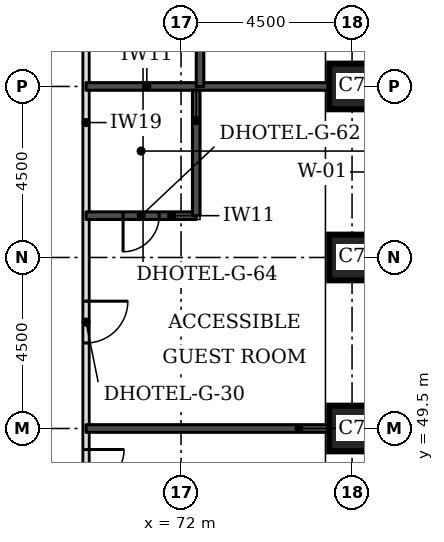
"""IFC4 building model, lengths in metres.
Left out: names, types, materials, properties, quantities, classifications, styles, units other than length and angle.
Written with IfcOpenShell. Run it as: python <this file> out.ifc"""

import sys

from ifc_helpers import new_model, si_unit, direction, frame, frame_2d, origin, origin_2d, place, context, subcontext, project, spatial, rectangle, extrude, element, fill, save


model = new_model("IFC4")
c1 = context("Model", 3, precision=1e-05, world=origin(), true_north=direction((0.0, 1.0)))
c2 = subcontext(c1, "Body", "Model", "MODEL_VIEW")
j1 = project(units=[si_unit("LENGTHUNIT", "METRE"), si_unit("PLANEANGLEUNIT", "RADIAN")], contexts=[c1])
p1 = place(None, origin())
s1 = spatial("IfcSite", under=j1, at=p1, CompositionType="ELEMENT")
p2 = place(p1, origin())
s2 = spatial("IfcBuilding", under=s1, at=p2, CompositionType="ELEMENT")
p3 = place(p2, frame((0.0, 0.0, 66.0)))
s3 = spatial("IfcBuildingStorey", under=s2, at=p3, CompositionType="ELEMENT", Elevation=66.0)
for number, where, z_axis, x_axis in (
    (1, (76.5, 49.5, 0.0), (0.0, 0.0, 1.0), (1.0, 0.0, 0.0)),
    (2, (76.5, 54.0, 0.0), (0.0, 0.0, 1.0), (1.0, 0.0, 0.0)),
    (3, (76.5, 58.5, 0.0), (0.0, 0.0, 1.0), (1.0, 0.0, 0.0)),
):
    element("IfcColumn", number, at=place(p3, frame(where, z_axis=z_axis, x_axis=x_axis)), inside=s3, PredefinedType="COLUMN", context=c2, shape_type="SweptSolid", body=[
        extrude(rectangle(XDim=1.2, YDim=1.2, at=origin_2d()), origin(), (0.0, 0.0, 1.0), 3.3),
    ])
p4 = place(p3, frame((69.5, 47.5, 0.0), z_axis=(0.0, 0.0, 1.0), x_axis=(0.0, 1.0, 0.0)))
e4 = element("IfcWall", 4, at=p4, inside=s3, PredefinedType="PARTITIONING", context=c2, shape_type="SweptSolid", body=[
    extrude(rectangle(XDim=26.5, YDim=0.15, at=frame_2d((13.25, 0.0))), origin(), (0.0, 0.0, 1.0), 3.08),
])
p5 = place(p4, frame((25.053, 0.0, 0.0)))
e5 = element("IfcOpeningElement", 5, at=p5, cuts=e4, PredefinedType="OPENING", context=c2, shape_type="SweptSolid", body=[
    extrude(rectangle(XDim=1.0, YDim=2.1, at=frame_2d((0.5, 1.05))), frame((0.0, 0.085, 0.0), z_axis=(0.0, -1.0, 0.0), x_axis=(1.0, 0.0, 0.0)), (0.0, 0.0, 1.0), 0.17),
])
p6 = place(p4, frame((22.925, 0.0, 0.0)))
e6 = element("IfcOpeningElement", 6, at=p6, cuts=e4, PredefinedType="OPENING", context=c2, shape_type="SweptSolid", body=[
    extrude(rectangle(XDim=1.0, YDim=2.1, at=frame_2d((0.5, 1.05))), frame((0.0, 0.085, 0.0), z_axis=(0.0, -1.0, 0.0), x_axis=(1.0, 0.0, 0.0)), (0.0, 0.0, 1.0), 0.17),
])
p7 = place(p4, frame((16.325, 0.0, 0.0)))
e7 = element("IfcOpeningElement", 7, at=p7, cuts=e4, PredefinedType="OPENING", context=c2, shape_type="SweptSolid", body=[
    extrude(rectangle(XDim=1.0, YDim=2.1, at=frame_2d((0.5, 1.05))), frame((0.0, 0.085, 0.0), z_axis=(0.0, -1.0, 0.0), x_axis=(1.0, 0.0, 0.0)), (0.0, 0.0, 1.0), 0.17),
])
p8 = place(p4, frame((13.925, 0.0, 0.0)))
e8 = element("IfcOpeningElement", 8, at=p8, cuts=e4, PredefinedType="OPENING", context=c2, shape_type="SweptSolid", body=[
    extrude(rectangle(XDim=1.0, YDim=2.1, at=frame_2d((0.5, 1.05))), frame((0.0, 0.085, 0.0), z_axis=(0.0, -1.0, 0.0), x_axis=(1.0, 0.0, 0.0)), (0.0, 0.0, 1.0), 0.17),
])
p9 = place(p4, frame((4.25, 0.0, 0.0)))
e9 = element("IfcOpeningElement", 9, at=p9, cuts=e4, PredefinedType="OPENING", context=c2, shape_type="SweptSolid", body=[
    extrude(rectangle(XDim=1.1, YDim=2.1, at=frame_2d((0.55, 1.05))), frame((0.0, 0.085, 0.0), z_axis=(0.0, -1.0, 0.0), x_axis=(1.0, 0.0, 0.0)), (0.0, 0.0, 1.0), 0.17),
])
p10 = place(p4, frame((0.447, 0.0, 0.0)))
e10 = element("IfcOpeningElement", 10, at=p10, cuts=e4, PredefinedType="OPENING", context=c2, shape_type="SweptSolid", body=[
    extrude(rectangle(XDim=1.0, YDim=2.1, at=frame_2d((0.5, 1.05))), frame((0.0, 0.085, 0.0), z_axis=(0.0, -1.0, 0.0), x_axis=(1.0, 0.0, 0.0)), (0.0, 0.0, 1.0), 0.17),
])
p11 = place(p3, frame((69.5, 49.5, 0.0), z_axis=(0.0, 0.0, 1.0), x_axis=(1.0, 0.0, 0.0)))
e11 = element("IfcWall", 11, at=p11, inside=s3, PredefinedType="SOLIDWALL", context=c2, shape_type="SweptSolid", body=[
    extrude(rectangle(XDim=6.4, YDim=0.2, at=frame_2d((3.2, 0.0))), origin(), (0.0, 0.0, 1.0), 3.08),
])
p12 = place(p3, frame((69.5, 55.1, 0.0), z_axis=(0.0, 0.0, 1.0), x_axis=(1.0, 0.0, 0.0)))
e12 = element("IfcWall", 12, at=p12, inside=s3, PredefinedType="SOLIDWALL", context=c2, shape_type="SweptSolid", body=[
    extrude(rectangle(XDim=2.9, YDim=0.2, at=frame_2d((1.45, 0.0))), origin(), (0.0, 0.0, 1.0), 3.08),
])
p13 = place(p12, frame((0.975, 0.0, 0.0)))
e13 = element("IfcOpeningElement", 13, at=p13, cuts=e12, PredefinedType="OPENING", context=c2, shape_type="SweptSolid", body=[
    extrude(rectangle(XDim=0.95, YDim=2.1, at=frame_2d((0.475, 1.05))), frame((0.0, 0.11, 0.0), z_axis=(0.0, -1.0, 0.0), x_axis=(1.0, 0.0, 0.0)), (0.0, 0.0, 1.0), 0.22),
])
p14 = place(p3, frame((72.4, 55.1, 0.0), z_axis=(0.0, 0.0, 1.0), x_axis=(0.0, 1.0, 0.0)))
e14 = element("IfcWall", 14, at=p14, inside=s3, PredefinedType="SOLIDWALL", context=c2, shape_type="SweptSolid", body=[
    extrude(rectangle(XDim=3.4, YDim=0.2, at=frame_2d((1.7, 0.0))), origin(), (0.0, 0.0, 1.0), 3.08),
])
p15 = place(p3, frame((69.5, 58.5, 0.0), z_axis=(0.0, 0.0, 1.0), x_axis=(1.0, 0.0, 0.0)))
e15 = element("IfcWall", 15, at=p15, inside=s3, PredefinedType="SOLIDWALL", context=c2, shape_type="SweptSolid", body=[
    extrude(rectangle(XDim=6.4, YDim=0.2, at=frame_2d((3.2, 0.0))), origin(), (0.0, 0.0, 1.0), 3.08),
])
p16 = place(p3, frame((72.5, 58.5, 0.0), z_axis=(0.0, 0.0, 1.0), x_axis=(0.0, 1.0, 0.0)))
e16 = element("IfcWall", 16, at=p16, inside=s3, PredefinedType="SOLIDWALL", context=c2, shape_type="SweptSolid", body=[
    extrude(rectangle(XDim=2.35, YDim=0.2, at=frame_2d((1.175, 0.0))), origin(), (0.0, 0.0, 1.0), 3.08),
])
p17 = place(p9, frame((1.1, 0.0, 0.0), z_axis=(0.0, 0.0, 1.0), x_axis=(-1.0, 0.0, 0.0)))
e17 = element("IfcDoor", 17, at=p17, inside=s3, OperationType="SINGLE_SWING_LEFT", PredefinedType="DOOR", context=c2, shape_type="SweptSolid", body=[
    extrude(rectangle(XDim=1.1, YDim=2.1, at=frame_2d((0.55, 1.05))), frame((0.0, 0.025, 0.0), z_axis=(0.0, -1.0, 0.0), x_axis=(1.0, 0.0, 0.0)), (0.0, 0.0, 1.0), 0.05),
])
fill(e9, e17)
p18 = place(p13, frame((0.95, 0.0, 0.0), z_axis=(0.0, 0.0, 1.0), x_axis=(-1.0, 0.0, 0.0)))
e18 = element("IfcDoor", 18, at=p18, inside=s3, OperationType="SINGLE_SWING_RIGHT", PredefinedType="DOOR", context=c2, shape_type="SweptSolid", body=[
    extrude(rectangle(XDim=0.95, YDim=2.1, at=frame_2d((0.475, 1.05))), frame((0.0, 0.025, 0.0), z_axis=(0.0, -1.0, 0.0), x_axis=(1.0, 0.0, 0.0)), (0.0, 0.0, 1.0), 0.05),
])
fill(e13, e18)
p19 = place(p10, frame((1.0, 0.0, 0.0), z_axis=(0.0, 0.0, 1.0), x_axis=(-1.0, 0.0, 0.0)))
e19 = element("IfcDoor", 19, at=p19, inside=s3, OperationType="SINGLE_SWING_LEFT", PredefinedType="DOOR", context=c2, shape_type="SweptSolid", body=[
    extrude(rectangle(XDim=1.0, YDim=2.1, at=frame_2d((0.5, 1.05))), frame((0.0, 0.025, 0.0), z_axis=(0.0, -1.0, 0.0), x_axis=(1.0, 0.0, 0.0)), (0.0, 0.0, 1.0), 0.05),
])
fill(e10, e19)
save(model, sys.argv[1])
